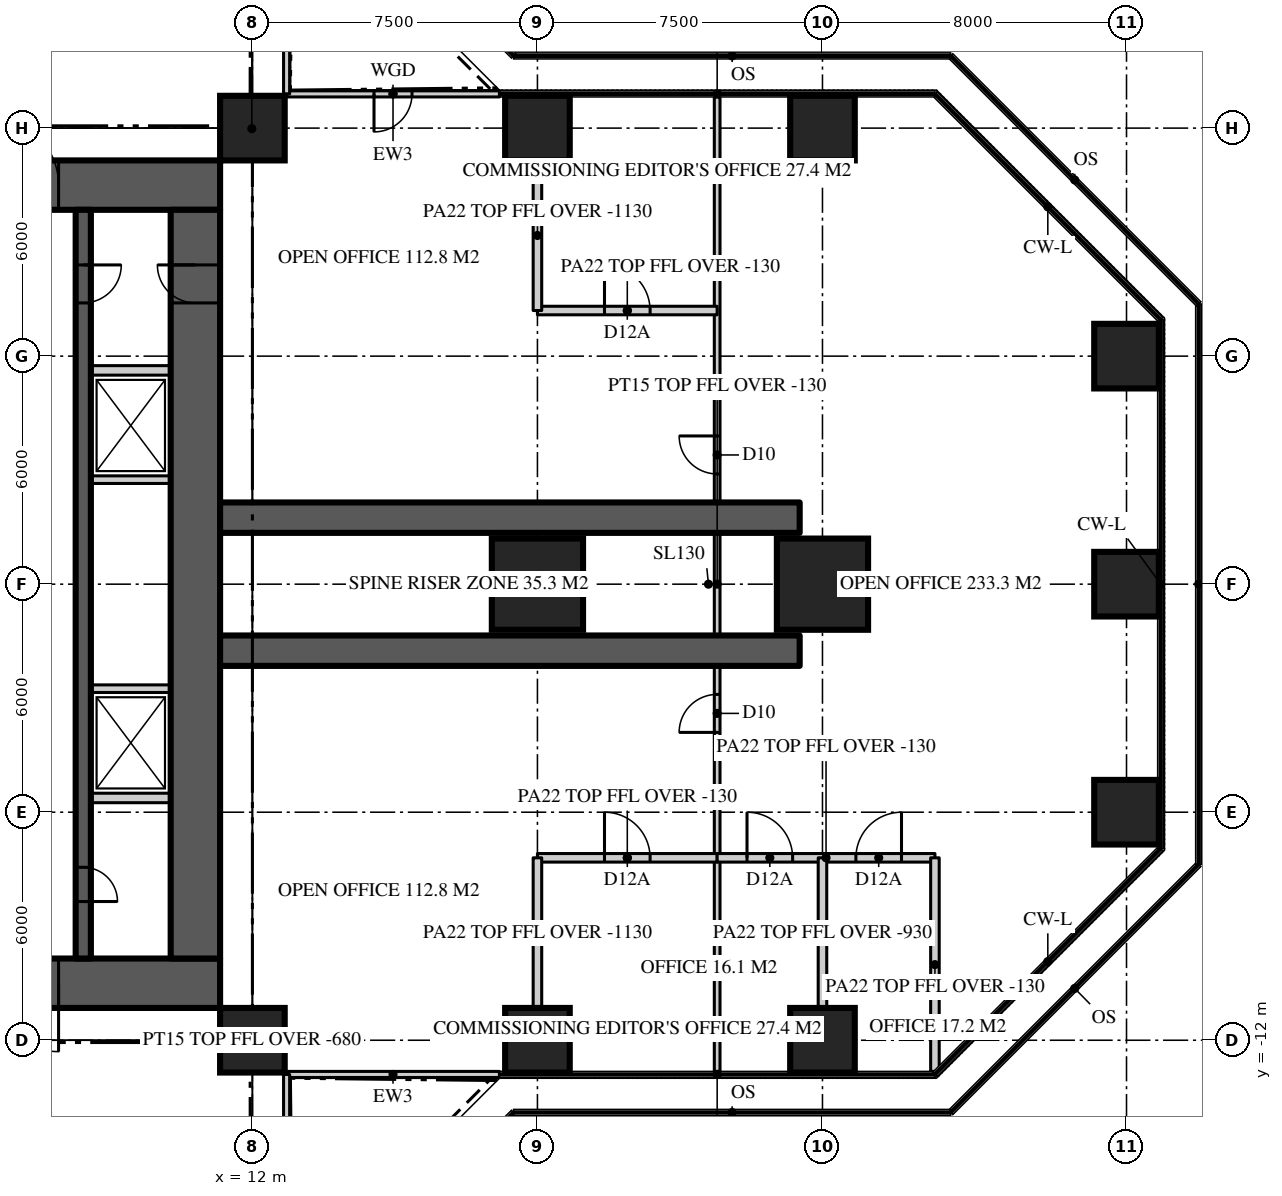
"""IFC4 building model, lengths in metres.
Left out: names, types, materials, properties, quantities, classifications, styles, units other than length and angle.
Written with IfcOpenShell. Run it as: python <this file> out.ifc"""

import sys

from ifc_helpers import new_model, si_unit, direction, frame, frame_2d, origin, origin_2d, place, context, subcontext, project, spatial, rectangle, extrude, element, fill, save


model = new_model("IFC4")
c1 = context("Model", 3, precision=1e-05, world=origin(), true_north=direction((0.0, 1.0)))
c2 = subcontext(c1, "Body", "Model", "MODEL_VIEW")
j1 = project(units=[si_unit("LENGTHUNIT", "METRE"), si_unit("PLANEANGLEUNIT", "RADIAN")], contexts=[c1])
p1 = place(None, origin())
s1 = spatial("IfcSite", under=j1, at=p1, CompositionType="ELEMENT")
p2 = place(p1, origin())
s2 = spatial("IfcBuilding", under=s1, at=p2, CompositionType="ELEMENT")
p3 = place(p2, frame((0.0, 0.0, 82.5)))
s3 = spatial("IfcBuildingStorey", under=s2, at=p3, CompositionType="ELEMENT", Elevation=82.5)
p4 = place(p3, frame((-11.15, 10.5, 0.0), z_axis=(0.0, 0.0, 1.0), x_axis=(1.0, 0.0, 0.0)))
e1 = element("IfcWall", 1, at=p4, inside=s3, PredefinedType="SHEAR", context=c2, shape_type="SweptSolid", body=[
    extrude(rectangle(XDim=22.3, YDim=1.3, at=frame_2d((11.15, 0.0))), origin(), (0.0, 0.0, 1.0), 3.9),
])
p5 = place(p4, frame((4.25, 0.0, 0.0)))
e2 = element("IfcOpeningElement", 2, at=p5, cuts=e1, PredefinedType="OPENING", context=c2, shape_type="SweptSolid", body=[
    extrude(rectangle(XDim=1.8, YDim=2.2, at=frame_2d((0.9, 1.1))), frame((0.0, 0.66, 0.0), z_axis=(0.0, -1.0, 0.0), x_axis=(1.0, 0.0, 0.0)), (0.0, 0.0, 1.0), 1.32),
])
p6 = place(p4, frame((16.25, 0.0, 0.0)))
e3 = element("IfcOpeningElement", 3, at=p6, cuts=e1, PredefinedType="OPENING", context=c2, shape_type="SweptSolid", body=[
    extrude(rectangle(XDim=1.8, YDim=2.2, at=frame_2d((0.9, 1.1))), frame((0.0, 0.66, 0.0), z_axis=(0.0, -1.0, 0.0), x_axis=(1.0, 0.0, 0.0)), (0.0, 0.0, 1.0), 1.32),
])
p7 = place(p3, frame((11.15, -10.5, 0.0), z_axis=(0.0, 0.0, 1.0), x_axis=(-1.0, 0.0, 0.0)))
e4 = element("IfcWall", 4, at=p7, inside=s3, PredefinedType="SHEAR", context=c2, shape_type="SweptSolid", body=[
    extrude(rectangle(XDim=22.3, YDim=1.3, at=frame_2d((11.15, 0.0))), origin(), (0.0, 0.0, 1.0), 3.9),
])
p8 = place(p7, frame((16.25, 0.0, 0.0)))
e5 = element("IfcOpeningElement", 5, at=p8, cuts=e4, PredefinedType="OPENING", context=c2, shape_type="SweptSolid", body=[
    extrude(rectangle(XDim=1.8, YDim=2.2, at=frame_2d((0.9, 1.1))), frame((0.0, 0.66, 0.0), z_axis=(0.0, -1.0, 0.0), x_axis=(1.0, 0.0, 0.0)), (0.0, 0.0, 1.0), 1.32),
])
p9 = place(p7, frame((4.25, 0.0, 0.0)))
e6 = element("IfcOpeningElement", 6, at=p9, cuts=e4, PredefinedType="OPENING", context=c2, shape_type="SweptSolid", body=[
    extrude(rectangle(XDim=1.8, YDim=2.2, at=frame_2d((0.9, 1.1))), frame((0.0, 0.66, 0.0), z_axis=(0.0, -1.0, 0.0), x_axis=(1.0, 0.0, 0.0)), (0.0, 0.0, 1.0), 1.32),
])
p10 = place(p3, frame((10.5, -9.85, 0.0), z_axis=(0.0, 0.0, 1.0), x_axis=(0.0, 1.0, 0.0)))
e7 = element("IfcWall", 7, at=p10, inside=s3, PredefinedType="SHEAR", context=c2, shape_type="SweptSolid", body=[
    extrude(rectangle(XDim=19.7, YDim=1.3, at=frame_2d((9.85, 0.0))), origin(), (0.0, 0.0, 1.0), 3.9),
])
p11 = place(p10, frame((17.25, 0.0, 0.0)))
e8 = element("IfcOpeningElement", 8, at=p11, cuts=e7, PredefinedType="OPENING", context=c2, shape_type="SweptSolid", body=[
    extrude(rectangle(XDim=1.0, YDim=2.2, at=frame_2d((0.5, 1.1))), frame((0.0, 0.66, 0.0), z_axis=(0.0, -1.0, 0.0), x_axis=(1.0, 0.0, 0.0)), (0.0, 0.0, 1.0), 1.32),
])
for number, where, z_axis, x_axis in (
    (9, (11.15, -1.75, 0.0), (0.0, 0.0, 1.0), (1.0, 0.0, 0.0)),
    (10, (11.15, 1.75, 0.0), (0.0, 0.0, 1.0), (1.0, 0.0, 0.0)),
):
    element("IfcWall", number, at=place(p3, frame(where, z_axis=z_axis, x_axis=x_axis)), inside=s3, PredefinedType="SHEAR", context=c2, shape_type="SweptSolid", body=[
        extrude(rectangle(XDim=15.25, YDim=0.8, at=frame_2d((7.625, 0.0))), origin(), (0.0, 0.0, 1.0), 3.9),
    ])
for number, where, z_axis, x_axis in (
    (11, (12.0, -12.0, 0.0), (0.0, 0.0, 1.0), (1.0, 0.0, 0.0)),
    (12, (19.5, -12.0, 0.0), (0.0, 0.0, 1.0), (1.0, 0.0, 0.0)),
    (13, (27.0, -12.0, 0.0), (0.0, 0.0, 1.0), (1.0, 0.0, 0.0)),
    (14, (35.0, -6.0, 0.0), (0.0, 0.0, 1.0), (1.0, 0.0, 0.0)),
):
    element("IfcColumn", number, at=place(p3, frame(where, z_axis=z_axis, x_axis=x_axis)), inside=s3, PredefinedType="COLUMN", context=c2, shape_type="SweptSolid", body=[
        extrude(rectangle(XDim=1.7, YDim=1.7, at=origin_2d()), origin(), (0.0, 0.0, 1.0), 3.9),
    ])
for number, where, z_axis, x_axis in (
    (15, (19.5, 0.0, 0.0), (0.0, 0.0, 1.0), (1.0, 0.0, 0.0)),
    (16, (27.0, 0.0, 0.0), (0.0, 0.0, 1.0), (1.0, 0.0, 0.0)),
):
    element("IfcColumn", number, at=place(p3, frame(where, z_axis=z_axis, x_axis=x_axis)), inside=s3, PredefinedType="COLUMN", context=c2, shape_type="SweptSolid", body=[
        extrude(rectangle(XDim=2.4, YDim=2.4, at=origin_2d()), origin(), (0.0, 0.0, 1.0), 3.9),
    ])
for number, where, z_axis, x_axis in (
    (17, (35.0, 0.0, 0.0), (0.0, 0.0, 1.0), (1.0, 0.0, 0.0)),
    (18, (35.0, 6.0, 0.0), (0.0, 0.0, 1.0), (1.0, 0.0, 0.0)),
    (19, (12.0, 12.0, 0.0), (0.0, 0.0, 1.0), (1.0, 0.0, 0.0)),
    (20, (19.5, 12.0, 0.0), (0.0, 0.0, 1.0), (1.0, 0.0, 0.0)),
    (21, (27.0, 12.0, 0.0), (0.0, 0.0, 1.0), (1.0, 0.0, 0.0)),
):
    element("IfcColumn", number, at=place(p3, frame(where, z_axis=z_axis, x_axis=x_axis)), inside=s3, PredefinedType="COLUMN", context=c2, shape_type="SweptSolid", body=[
        extrude(rectangle(XDim=1.7, YDim=1.7, at=origin_2d()), origin(), (0.0, 0.0, 1.0), 3.9),
    ])
p12 = place(p3, frame((12.9, -12.9, 0.0), z_axis=(0.0, 0.0, 1.0), x_axis=(1.0, 0.0, 0.0)))
e22 = element("IfcWall", 22, at=p12, inside=s3, PredefinedType="SOLIDWALL", context=c2, shape_type="SweptSolid", body=[
    extrude(rectangle(XDim=5.6, YDim=0.16, at=frame_2d((2.8, 0.0))), origin(), (0.0, 0.0, 1.0), 3.77),
])
p13 = place(p3, frame((18.5, 12.9, 0.0), z_axis=(0.0, 0.0, 1.0), x_axis=(-1.0, 0.0, 0.0)))
e23 = element("IfcWall", 23, at=p13, inside=s3, PredefinedType="SOLIDWALL", context=c2, shape_type="SweptSolid", body=[
    extrude(rectangle(XDim=5.6, YDim=0.16, at=frame_2d((2.8, 0.0))), origin(), (0.0, 0.0, 1.0), 3.77),
])
p14 = place(p13, frame((2.3, 0.0, 0.0)))
e24 = element("IfcOpeningElement", 24, at=p14, cuts=e23, PredefinedType="OPENING", context=c2, shape_type="SweptSolid", body=[
    extrude(rectangle(XDim=1.0, YDim=2.2, at=frame_2d((0.5, 1.1))), frame((0.0, 0.09, 0.0), z_axis=(0.0, -1.0, 0.0), x_axis=(1.0, 0.0, 0.0)), (0.0, 0.0, 1.0), 0.18),
])
p15 = place(p3, frame((12.9, 12.9, 0.0), z_axis=(0.0, 0.0, 1.0), x_axis=(0.0, 1.0, 0.0)))
e25 = element("IfcWall", 25, at=p15, inside=s3, PredefinedType="SOLIDWALL", context=c2, shape_type="SweptSolid", body=[
    extrude(rectangle(XDim=5.6, YDim=0.16, at=frame_2d((2.8, 0.0))), origin(), (0.0, 0.0, 1.0), 3.77),
])
p16 = place(p3, frame((12.9, -18.5, 0.0), z_axis=(0.0, 0.0, 1.0), x_axis=(0.0, 1.0, 0.0)))
e26 = element("IfcWall", 26, at=p16, inside=s3, PredefinedType="SOLIDWALL", context=c2, shape_type="SweptSolid", body=[
    extrude(rectangle(XDim=5.6, YDim=0.16, at=frame_2d((2.8, 0.0))), origin(), (0.0, 0.0, 1.0), 3.77),
])
p17 = place(p16, frame((2.3, 0.0, 0.0)))
e27 = element("IfcOpeningElement", 27, at=p17, cuts=e26, PredefinedType="OPENING", context=c2, shape_type="SweptSolid", body=[
    extrude(rectangle(XDim=1.0, YDim=2.2, at=frame_2d((0.5, 1.1))), frame((0.0, 0.09, 0.0), z_axis=(0.0, -1.0, 0.0), x_axis=(1.0, 0.0, 0.0)), (0.0, 0.0, 1.0), 0.18),
])
p18 = place(p3, frame((7.55, 9.85, 0.0), z_axis=(0.0, 0.0, 1.0), x_axis=(0.0, -1.0, 0.0)))
e28 = element("IfcWall", 28, at=p18, inside=s3, PredefinedType="SHEAR", context=c2, shape_type="SweptSolid", body=[
    extrude(rectangle(XDim=19.7, YDim=0.4, at=frame_2d((9.85, 0.0))), origin(), (0.0, 0.0, 1.0), 3.9),
])
p19 = place(p18, frame((1.45, 0.0, 0.0)))
e29 = element("IfcOpeningElement", 29, at=p19, cuts=e28, PredefinedType="OPENING", context=c2, shape_type="SweptSolid", body=[
    extrude(rectangle(XDim=1.0, YDim=2.2, at=frame_2d((0.5, 1.1))), frame((0.0, 0.21, 0.0), z_axis=(0.0, -1.0, 0.0), x_axis=(1.0, 0.0, 0.0)), (0.0, 0.0, 1.0), 0.42),
])
p20 = place(p18, frame((17.3, 0.0, 0.0)))
e30 = element("IfcOpeningElement", 30, at=p20, cuts=e28, PredefinedType="OPENING", context=c2, shape_type="SweptSolid", body=[
    extrude(rectangle(XDim=0.9, YDim=2.1, at=frame_2d((0.45, 1.05))), frame((0.0, 0.21, 0.0), z_axis=(0.0, -1.0, 0.0), x_axis=(1.0, 0.0, 0.0)), (0.0, 0.0, 1.0), 0.42),
])
for number, where, z_axis, x_axis in (
    (31, (7.75, 5.625, 0.0), (0.0, 0.0, 1.0), (1.0, 0.0, 0.0)),
    (32, (7.75, -5.625, 0.0), (0.0, 0.0, 1.0), (1.0, 0.0, 0.0)),
):
    element("IfcWall", number, at=place(p3, frame(where, z_axis=z_axis, x_axis=x_axis)), inside=s3, PredefinedType="SOLIDWALL", context=c2, shape_type="SweptSolid", body=[
        extrude(rectangle(XDim=2.1, YDim=0.25, at=frame_2d((1.05, 0.0))), origin(), (0.0, 0.0, 1.0), 3.7),
    ])
for number, where, z_axis, x_axis in (
    (33, (7.75, -2.75, 0.0), (0.0, 0.0, 1.0), (1.0, 0.0, 0.0)),
    (34, (7.75, 2.75, 0.0), (0.0, 0.0, 1.0), (1.0, 0.0, 0.0)),
):
    element("IfcWall", number, at=place(p3, frame(where, z_axis=z_axis, x_axis=x_axis)), inside=s3, PredefinedType="SOLIDWALL", context=c2, shape_type="SweptSolid", body=[
        extrude(rectangle(XDim=2.1, YDim=0.2, at=frame_2d((1.05, 0.0))), origin(), (0.0, 0.0, 1.0), 3.7),
    ])
p21 = place(p3, frame((24.229, -12.82, 0.0), z_axis=(0.0, 0.0, 1.0), x_axis=(0.0, 1.0, 0.0)))
e35 = element("IfcWall", 35, at=p21, inside=s3, PredefinedType="PARTITIONING", context=c2, shape_type="SweptSolid", body=[
    extrude(rectangle(XDim=25.64, YDim=0.15, at=frame_2d((12.82, 0.0))), origin(), (0.0, 0.0, 1.0), 3.77),
])
p22 = place(p21, frame((15.72, 0.0, 0.0)))
e36 = element("IfcOpeningElement", 36, at=p22, cuts=e35, PredefinedType="OPENING", context=c2, shape_type="SweptSolid", body=[
    extrude(rectangle(XDim=1.0, YDim=2.2, at=frame_2d((0.5, 1.1))), frame((0.0, 0.085, 0.0), z_axis=(0.0, -1.0, 0.0), x_axis=(1.0, 0.0, 0.0)), (0.0, 0.0, 1.0), 0.17),
])
p23 = place(p21, frame((8.92, 0.0, 0.0)))
e37 = element("IfcOpeningElement", 37, at=p23, cuts=e35, PredefinedType="OPENING", context=c2, shape_type="SweptSolid", body=[
    extrude(rectangle(XDim=1.0, YDim=2.2, at=frame_2d((0.5, 1.1))), frame((0.0, 0.085, 0.0), z_axis=(0.0, -1.0, 0.0), x_axis=(1.0, 0.0, 0.0)), (0.0, 0.0, 1.0), 0.17),
])
p24 = place(p3, frame((19.5, 7.2, 0.0), z_axis=(0.0, 0.0, 1.0), x_axis=(1.0, 0.0, 0.0)))
e38 = element("IfcWall", 38, at=p24, inside=s3, PredefinedType="PARTITIONING", context=c2, shape_type="SweptSolid", body=[
    extrude(rectangle(XDim=4.729, YDim=0.225, at=frame_2d((2.365, 0.0))), origin(), (0.0, 0.0, 1.0), 3.77),
])
p25 = place(p24, frame((1.764, 0.0, 0.0)))
e39 = element("IfcOpeningElement", 39, at=p25, cuts=e38, PredefinedType="OPENING", context=c2, shape_type="SweptSolid", body=[
    extrude(rectangle(XDim=1.2, YDim=2.2, at=frame_2d((0.6, 1.1))), frame((0.0, 0.123, 0.0), z_axis=(0.0, -1.0, 0.0), x_axis=(1.0, 0.0, 0.0)), (0.0, 0.0, 1.0), 0.245),
])
p26 = place(p3, frame((19.5, 7.2, 0.0), z_axis=(0.0, 0.0, 1.0), x_axis=(0.0, 1.0, 0.0)))
e40 = element("IfcWall", 40, at=p26, inside=s3, PredefinedType="PARTITIONING", context=c2, shape_type="SweptSolid", body=[
    extrude(rectangle(XDim=3.95, YDim=0.225, at=frame_2d((1.975, 0.0))), origin(), (0.0, 0.0, 1.0), 2.77),
])
p27 = place(p3, frame((19.5, -7.2, 0.0), z_axis=(0.0, 0.0, 1.0), x_axis=(1.0, 0.0, 0.0)))
e41 = element("IfcWall", 41, at=p27, inside=s3, PredefinedType="PARTITIONING", context=c2, shape_type="SweptSolid", body=[
    extrude(rectangle(XDim=4.729, YDim=0.225, at=frame_2d((2.365, 0.0))), origin(), (0.0, 0.0, 1.0), 3.77),
])
p28 = place(p27, frame((1.764, 0.0, 0.0)))
e42 = element("IfcOpeningElement", 42, at=p28, cuts=e41, PredefinedType="OPENING", context=c2, shape_type="SweptSolid", body=[
    extrude(rectangle(XDim=1.2, YDim=2.2, at=frame_2d((0.6, 1.1))), frame((0.0, 0.123, 0.0), z_axis=(0.0, -1.0, 0.0), x_axis=(1.0, 0.0, 0.0)), (0.0, 0.0, 1.0), 0.245),
])
p29 = place(p3, frame((24.229, -7.2, 0.0), z_axis=(0.0, 0.0, 1.0), x_axis=(1.0, 0.0, 0.0)))
e43 = element("IfcWall", 43, at=p29, inside=s3, PredefinedType="PARTITIONING", context=c2, shape_type="SweptSolid", body=[
    extrude(rectangle(XDim=5.73, YDim=0.225, at=frame_2d((2.865, 0.0))), origin(), (0.0, 0.0, 1.0), 3.77),
])
p30 = place(p29, frame((0.785, 0.0, 0.0)))
e44 = element("IfcOpeningElement", 44, at=p30, cuts=e43, PredefinedType="OPENING", context=c2, shape_type="SweptSolid", body=[
    extrude(rectangle(XDim=1.2, YDim=2.2, at=frame_2d((0.6, 1.1))), frame((0.0, 0.123, 0.0), z_axis=(0.0, -1.0, 0.0), x_axis=(1.0, 0.0, 0.0)), (0.0, 0.0, 1.0), 0.245),
])
p31 = place(p29, frame((3.65, 0.0, 0.0)))
e45 = element("IfcOpeningElement", 45, at=p31, cuts=e43, PredefinedType="OPENING", context=c2, shape_type="SweptSolid", body=[
    extrude(rectangle(XDim=1.2, YDim=2.2, at=frame_2d((0.6, 1.1))), frame((0.0, 0.123, 0.0), z_axis=(0.0, -1.0, 0.0), x_axis=(1.0, 0.0, 0.0)), (0.0, 0.0, 1.0), 0.245),
])
p32 = place(p3, frame((19.5, -7.2, 0.0), z_axis=(0.0, 0.0, 1.0), x_axis=(0.0, -1.0, 0.0)))
e46 = element("IfcWall", 46, at=p32, inside=s3, PredefinedType="PARTITIONING", context=c2, shape_type="SweptSolid", body=[
    extrude(rectangle(XDim=3.95, YDim=0.225, at=frame_2d((1.975, 0.0))), origin(), (0.0, 0.0, 1.0), 2.77),
])
p33 = place(p3, frame((27.0, -7.2, 0.0), z_axis=(0.0, 0.0, 1.0), x_axis=(0.0, -1.0, 0.0)))
e47 = element("IfcWall", 47, at=p33, inside=s3, PredefinedType="PARTITIONING", context=c2, shape_type="SweptSolid", body=[
    extrude(rectangle(XDim=3.95, YDim=0.225, at=frame_2d((1.975, 0.0))), origin(), (0.0, 0.0, 1.0), 2.97),
])
p34 = place(p3, frame((29.959, -7.2, 0.0), z_axis=(0.0, 0.0, 1.0), x_axis=(0.0, -1.0, 0.0)))
e48 = element("IfcWall", 48, at=p34, inside=s3, PredefinedType="PARTITIONING", context=c2, shape_type="SweptSolid", body=[
    extrude(rectangle(XDim=5.62, YDim=0.225, at=frame_2d((2.81, 0.0))), origin(), (0.0, 0.0, 1.0), 3.77),
])
for number, where, z_axis, x_axis in (
    (49, (11.15, 11.15, 0.0), (0.0, 0.0, 1.0), (0.707, 0.707, 0.0)),
    (50, (11.15, -11.15, 0.0), (0.0, 0.0, 1.0), (0.707, -0.707, 0.0)),
):
    element("IfcWall", number, at=place(p3, frame(where, z_axis=z_axis, x_axis=x_axis)), inside=s3, PredefinedType="PARTITIONING", context=c2, shape_type="SweptSolid", body=[
        extrude(rectangle(XDim=2.362, YDim=0.15, at=frame_2d((1.181, 0.0))), origin(), (0.0, 0.0, 1.0), 3.22),
    ])
p35 = place(p14, origin())
e51 = element("IfcDoor", 51, at=p35, inside=s3, OperationType="SINGLE_SWING_RIGHT", PredefinedType="DOOR", context=c2, shape_type="SweptSolid", body=[
    extrude(rectangle(XDim=1.0, YDim=2.2, at=frame_2d((0.5, 1.1))), frame((0.0, 0.025, 0.0), z_axis=(0.0, -1.0, 0.0), x_axis=(1.0, 0.0, 0.0)), (0.0, 0.0, 1.0), 0.05),
])
fill(e24, e51)
p36 = place(p6, origin())
e52 = element("IfcDoor", 52, at=p36, inside=s3, OperationType="DOUBLE_DOOR_DOUBLE_SWING", PredefinedType="DOOR", context=c2, shape_type="SweptSolid", body=[
    extrude(rectangle(XDim=1.8, YDim=2.2, at=frame_2d((0.9, 1.1))), frame((0.0, 0.025, 0.0), z_axis=(0.0, -1.0, 0.0), x_axis=(1.0, 0.0, 0.0)), (0.0, 0.0, 1.0), 0.05),
])
fill(e3, e52)
p37 = place(p9, origin())
e53 = element("IfcDoor", 53, at=p37, inside=s3, OperationType="DOUBLE_DOOR_DOUBLE_SWING", PredefinedType="DOOR", context=c2, shape_type="SweptSolid", body=[
    extrude(rectangle(XDim=1.8, YDim=2.2, at=frame_2d((0.9, 1.1))), frame((0.0, 0.025, 0.0), z_axis=(0.0, -1.0, 0.0), x_axis=(1.0, 0.0, 0.0)), (0.0, 0.0, 1.0), 0.05),
])
fill(e6, e53)
p38 = place(p19, origin())
e54 = element("IfcDoor", 54, at=p38, inside=s3, OperationType="SINGLE_SWING_LEFT", PredefinedType="DOOR", context=c2, shape_type="SweptSolid", body=[
    extrude(rectangle(XDim=1.0, YDim=2.2, at=frame_2d((0.5, 1.1))), frame((0.0, 0.025, 0.0), z_axis=(0.0, -1.0, 0.0), x_axis=(1.0, 0.0, 0.0)), (0.0, 0.0, 1.0), 0.05),
])
fill(e29, e54)
p39 = place(p11, origin())
e55 = element("IfcDoor", 55, at=p39, inside=s3, OperationType="SINGLE_SWING_RIGHT", PredefinedType="DOOR", context=c2, shape_type="SweptSolid", body=[
    extrude(rectangle(XDim=1.0, YDim=2.2, at=frame_2d((0.5, 1.1))), frame((0.0, 0.025, 0.0), z_axis=(0.0, -1.0, 0.0), x_axis=(1.0, 0.0, 0.0)), (0.0, 0.0, 1.0), 0.05),
])
fill(e8, e55)
p40 = place(p20, origin())
e56 = element("IfcDoor", 56, at=p40, inside=s3, OperationType="SINGLE_SWING_RIGHT", PredefinedType="DOOR", context=c2, shape_type="SweptSolid", body=[
    extrude(rectangle(XDim=0.9, YDim=2.1, at=frame_2d((0.45, 1.05))), frame((0.0, 0.025, 0.0), z_axis=(0.0, -1.0, 0.0), x_axis=(1.0, 0.0, 0.0)), (0.0, 0.0, 1.0), 0.05),
])
fill(e30, e56)
p41 = place(p22, origin())
e57 = element("IfcDoor", 57, at=p41, inside=s3, OperationType="SINGLE_SWING_RIGHT", PredefinedType="DOOR", context=c2, shape_type="SweptSolid", body=[
    extrude(rectangle(XDim=1.0, YDim=2.2, at=frame_2d((0.5, 1.1))), frame((0.0, 0.025, 0.0), z_axis=(0.0, -1.0, 0.0), x_axis=(1.0, 0.0, 0.0)), (0.0, 0.0, 1.0), 0.05),
])
fill(e36, e57)
p42 = place(p23, origin())
e58 = element("IfcDoor", 58, at=p42, inside=s3, OperationType="SINGLE_SWING_LEFT", PredefinedType="DOOR", context=c2, shape_type="SweptSolid", body=[
    extrude(rectangle(XDim=1.0, YDim=2.2, at=frame_2d((0.5, 1.1))), frame((0.0, 0.025, 0.0), z_axis=(0.0, -1.0, 0.0), x_axis=(1.0, 0.0, 0.0)), (0.0, 0.0, 1.0), 0.05),
])
fill(e37, e58)
p43 = place(p25, origin())
e59 = element("IfcDoor", 59, at=p43, inside=s3, OperationType="SINGLE_SWING_LEFT", PredefinedType="DOOR", context=c2, shape_type="SweptSolid", body=[
    extrude(rectangle(XDim=1.2, YDim=2.2, at=frame_2d((0.6, 1.1))), frame((0.0, 0.025, 0.0), z_axis=(0.0, -1.0, 0.0), x_axis=(1.0, 0.0, 0.0)), (0.0, 0.0, 1.0), 0.05),
])
fill(e39, e59)
p44 = place(p28, origin())
e60 = element("IfcDoor", 60, at=p44, inside=s3, OperationType="SINGLE_SWING_LEFT", PredefinedType="DOOR", context=c2, shape_type="SweptSolid", body=[
    extrude(rectangle(XDim=1.2, YDim=2.2, at=frame_2d((0.6, 1.1))), frame((0.0, 0.025, 0.0), z_axis=(0.0, -1.0, 0.0), x_axis=(1.0, 0.0, 0.0)), (0.0, 0.0, 1.0), 0.05),
])
fill(e42, e60)
p45 = place(p30, origin())
e61 = element("IfcDoor", 61, at=p45, inside=s3, OperationType="SINGLE_SWING_LEFT", PredefinedType="DOOR", context=c2, shape_type="SweptSolid", body=[
    extrude(rectangle(XDim=1.2, YDim=2.2, at=frame_2d((0.6, 1.1))), frame((0.0, 0.025, 0.0), z_axis=(0.0, -1.0, 0.0), x_axis=(1.0, 0.0, 0.0)), (0.0, 0.0, 1.0), 0.05),
])
fill(e44, e61)
p46 = place(p31, origin())
e62 = element("IfcDoor", 62, at=p46, inside=s3, OperationType="SINGLE_SWING_RIGHT", PredefinedType="DOOR", context=c2, shape_type="SweptSolid", body=[
    extrude(rectangle(XDim=1.2, YDim=2.2, at=frame_2d((0.6, 1.1))), frame((0.0, 0.025, 0.0), z_axis=(0.0, -1.0, 0.0), x_axis=(1.0, 0.0, 0.0)), (0.0, 0.0, 1.0), 0.05),
])
fill(e45, e62)
save(model, sys.argv[1])
